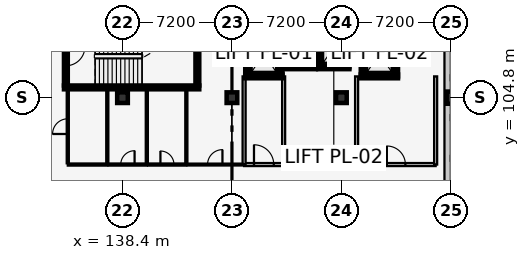
"""IFC4 building model, lengths in metres.
Left out: names, types, materials, properties, quantities, classifications, styles, units other than length and angle.
Written with IfcOpenShell. Run it as: python <this file> out.ifc"""

import sys

from ifc_helpers import new_model, si_unit, direction, frame, frame_2d, origin, origin_2d, place, context, subcontext, project, spatial, rectangle, extrude, element, fill, save


model = new_model("IFC4")
c1 = context("Model", 3, precision=1e-05, world=origin(), true_north=direction((0.0, 1.0)))
c2 = subcontext(c1, "Body", "Model", "MODEL_VIEW")
j1 = project(units=[si_unit("LENGTHUNIT", "METRE"), si_unit("PLANEANGLEUNIT", "RADIAN")], contexts=[c1])
p1 = place(None, origin())
s1 = spatial("IfcSite", under=j1, at=p1, CompositionType="ELEMENT")
p2 = place(p1, origin())
s2 = spatial("IfcBuilding", under=s1, at=p2, CompositionType="ELEMENT")
p3 = place(p2, frame((0.0, 0.0, 9.6)))
s3 = spatial("IfcBuildingStorey", under=s2, at=p3, CompositionType="ELEMENT", Elevation=9.6)
for number, where, z_axis, x_axis in (
    (1, (138.4, 104.8, 0.0), (0.0, 0.0, 1.0), (1.0, 0.0, 0.0)),
    (2, (145.6, 104.8, 0.0), (0.0, 0.0, 1.0), (1.0, 0.0, 0.0)),
    (3, (152.8, 104.8, 0.0), (0.0, 0.0, 1.0), (1.0, 0.0, 0.0)),
):
    element("IfcColumn", number, at=place(p3, frame(where, z_axis=z_axis, x_axis=x_axis)), inside=s3, PredefinedType="COLUMN", context=c2, shape_type="SweptSolid", body=[
        extrude(rectangle(XDim=0.7, YDim=0.7, at=origin_2d()), origin(), (0.0, 0.0, 1.0), 4.2),
    ])
p4 = place(p3, frame((160.0, 104.8, 0.0), z_axis=(0.0, 0.0, 1.0), x_axis=(1.0, 0.0, 0.0)))
e4 = element("IfcColumn", 4, at=p4, inside=s3, PredefinedType="COLUMN", context=c2, shape_type="SweptSolid", body=[
    extrude(rectangle(XDim=0.55, YDim=0.8, at=origin_2d()), origin(), (0.0, 0.0, 1.0), 4.2),
])
p5 = place(p3, frame((159.79, 112.0, 0.0), z_axis=(0.0, 0.0, 1.0), x_axis=(0.0, -1.0, 0.0)))
e5 = element("IfcWall", 5, at=p5, inside=s3, PredefinedType="SOLIDWALL", context=c2, shape_type="SweptSolid", body=[
    extrude(rectangle(XDim=28.8, YDim=0.42, at=frame_2d((14.4, 0.0))), origin(), (0.0, 0.0, 1.0), 3.345),
])
p6 = place(p3, frame((134.55, 105.475, 0.0), z_axis=(0.0, 0.0, 1.0), x_axis=(1.0, 0.0, 0.0)))
e6 = element("IfcWall", 6, at=p6, inside=s3, PredefinedType="SHEAR", context=c2, shape_type="SweptSolid", body=[
    extrude(rectangle(XDim=8.9, YDim=0.25, at=frame_2d((4.45, 0.0))), origin(), (0.0, 0.0, 1.0), 3.95),
])
p7 = place(p3, frame((134.675, 109.45, 0.0), z_axis=(0.0, 0.0, 1.0), x_axis=(0.0, -1.0, 0.0)))
e7 = element("IfcWall", 7, at=p7, inside=s3, PredefinedType="SHEAR", context=c2, shape_type="SweptSolid", body=[
    extrude(rectangle(XDim=3.85, YDim=0.25, at=frame_2d((1.925, 0.0))), origin(), (0.0, 0.0, 1.0), 3.95),
])
p8 = place(p7, frame((1.3, 0.0, 0.0)))
e8 = element("IfcOpeningElement", 8, at=p8, cuts=e7, PredefinedType="OPENING", context=c2, shape_type="SweptSolid", body=[
    extrude(rectangle(XDim=1.25, YDim=2.15, at=frame_2d((0.625, 1.075))), frame((0.0, 0.137, 0.0), z_axis=(0.0, -1.0, 0.0), x_axis=(1.0, 0.0, 0.0)), (0.0, 0.0, 1.0), 0.274),
])
p9 = place(p3, frame((143.325, 105.6, 0.0), z_axis=(0.0, 0.0, 1.0), x_axis=(0.0, 1.0, 0.0)))
e9 = element("IfcWall", 9, at=p9, inside=s3, PredefinedType="SHEAR", context=c2, shape_type="SweptSolid", body=[
    extrude(rectangle(XDim=3.85, YDim=0.25, at=frame_2d((1.925, 0.0))), origin(), (0.0, 0.0, 1.0), 3.95),
])
p10 = place(p3, frame((146.475, 106.2, 0.0), z_axis=(0.0, 0.0, 1.0), x_axis=(1.0, 0.0, 0.0)))
e10 = element("IfcWall", 10, at=p10, inside=s3, PredefinedType="SHEAR", context=c2, shape_type="SweptSolid", body=[
    extrude(rectangle(XDim=2.45, YDim=0.25, at=frame_2d((1.225, 0.0))), origin(), (0.0, 0.0, 1.0), 3.95),
])
p11 = place(p10, frame((0.675, 0.0, 0.0)))
e11 = element("IfcOpeningElement", 11, at=p11, cuts=e10, PredefinedType="OPENING", context=c2, shape_type="SweptSolid", body=[
    extrude(rectangle(XDim=1.1, YDim=2.15, at=frame_2d((0.55, 1.075))), frame((0.0, 0.137, 0.0), z_axis=(0.0, -1.0, 0.0), x_axis=(1.0, 0.0, 0.0)), (0.0, 0.0, 1.0), 0.274),
])
for number, where, z_axis, x_axis in (
    (12, (146.6, 109.2, 0.0), (0.0, 0.0, 1.0), (0.0, -1.0, 0.0)),
    (13, (148.8, 106.2, 0.0), (0.0, 0.0, 1.0), (0.0, 1.0, 0.0)),
):
    element("IfcWall", number, at=place(p3, frame(where, z_axis=z_axis, x_axis=x_axis)), inside=s3, PredefinedType="SHEAR", context=c2, shape_type="SweptSolid", body=[
        extrude(rectangle(XDim=3.0, YDim=0.25, at=frame_2d((1.5, 0.0))), origin(), (0.0, 0.0, 1.0), 3.95),
    ])
p12 = place(p3, frame((146.4, 100.4, 0.0), z_axis=(0.0, 0.0, 1.0), x_axis=(1.0, 0.0, 0.0)))
e14 = element("IfcWall", 14, at=p12, inside=s3, PredefinedType="PARTITIONING", context=c2, shape_type="SweptSolid", body=[
    extrude(rectangle(XDim=2.6, YDim=0.2, at=frame_2d((1.3, 0.0))), origin(), (0.0, 0.0, 1.0), 3.95),
])
p13 = place(p12, frame((0.65, 0.0, 0.0)))
e15 = element("IfcOpeningElement", 15, at=p13, cuts=e14, PredefinedType="OPENING", context=c2, shape_type="SweptSolid", body=[
    extrude(rectangle(XDim=1.3, YDim=2.2, at=frame_2d((0.65, 1.1))), frame((0.0, 0.112, 0.0), z_axis=(0.0, -1.0, 0.0), x_axis=(1.0, 0.0, 0.0)), (0.0, 0.0, 1.0), 0.224),
])
p14 = place(p3, frame((146.4, 106.2, 0.0), z_axis=(0.0, 0.0, 1.0), x_axis=(0.0, -1.0, 0.0)))
e16 = element("IfcWall", 16, at=p14, inside=s3, PredefinedType="PARTITIONING", context=c2, shape_type="SweptSolid", body=[
    extrude(rectangle(XDim=5.8, YDim=0.2, at=frame_2d((2.9, 0.0))), origin(), (0.0, 0.0, 1.0), 3.95),
])
p15 = place(p3, frame((149.0, 100.4, 0.0), z_axis=(0.0, 0.0, 1.0), x_axis=(0.0, 1.0, 0.0)))
e17 = element("IfcWall", 17, at=p15, inside=s3, PredefinedType="PARTITIONING", context=c2, shape_type="SweptSolid", body=[
    extrude(rectangle(XDim=5.8, YDim=0.2, at=frame_2d((2.9, 0.0))), origin(), (0.0, 0.0, 1.0), 3.705),
])
p16 = place(p3, frame((154.075, 106.2, 0.0), z_axis=(0.0, 0.0, 1.0), x_axis=(1.0, 0.0, 0.0)))
e18 = element("IfcWall", 18, at=p16, inside=s3, PredefinedType="SHEAR", context=c2, shape_type="SweptSolid", body=[
    extrude(rectangle(XDim=2.45, YDim=0.25, at=frame_2d((1.225, 0.0))), origin(), (0.0, 0.0, 1.0), 3.95),
])
p17 = place(p16, frame((0.675, 0.0, 0.0)))
e19 = element("IfcOpeningElement", 19, at=p17, cuts=e18, PredefinedType="OPENING", context=c2, shape_type="SweptSolid", body=[
    extrude(rectangle(XDim=1.1, YDim=2.15, at=frame_2d((0.55, 1.075))), frame((0.0, 0.137, 0.0), z_axis=(0.0, -1.0, 0.0), x_axis=(1.0, 0.0, 0.0)), (0.0, 0.0, 1.0), 0.274),
])
for number, where, z_axis, x_axis in (
    (20, (154.2, 109.2, 0.0), (0.0, 0.0, 1.0), (0.0, -1.0, 0.0)),
    (21, (156.4, 106.2, 0.0), (0.0, 0.0, 1.0), (0.0, 1.0, 0.0)),
):
    element("IfcWall", number, at=place(p3, frame(where, z_axis=z_axis, x_axis=x_axis)), inside=s3, PredefinedType="SHEAR", context=c2, shape_type="SweptSolid", body=[
        extrude(rectangle(XDim=3.0, YDim=0.25, at=frame_2d((1.5, 0.0))), origin(), (0.0, 0.0, 1.0), 3.95),
    ])
p18 = place(p3, frame((153.8, 100.4, 0.0), z_axis=(0.0, 0.0, 1.0), x_axis=(1.0, 0.0, 0.0)))
e22 = element("IfcWall", 22, at=p18, inside=s3, PredefinedType="PARTITIONING", context=c2, shape_type="SweptSolid", body=[
    extrude(rectangle(XDim=5.2, YDim=0.2, at=frame_2d((2.6, 0.0))), origin(), (0.0, 0.0, 1.0), 3.95),
])
p19 = place(p18, frame((1.99, 0.0, 0.0)))
e23 = element("IfcOpeningElement", 23, at=p19, cuts=e22, PredefinedType="OPENING", context=c2, shape_type="SweptSolid", body=[
    extrude(rectangle(XDim=1.22, YDim=2.2, at=frame_2d((0.61, 1.1))), frame((0.0, 0.112, 0.0), z_axis=(0.0, -1.0, 0.0), x_axis=(1.0, 0.0, 0.0)), (0.0, 0.0, 1.0), 0.224),
])
for number, where, z_axis, x_axis in (
    (24, (153.8, 106.2, 0.0), (0.0, 0.0, 1.0), (0.0, -1.0, 0.0)),
    (25, (159.0, 100.4, 0.0), (0.0, 0.0, 1.0), (0.0, 1.0, 0.0)),
):
    element("IfcWall", number, at=place(p3, frame(where, z_axis=z_axis, x_axis=x_axis)), inside=s3, PredefinedType="PARTITIONING", context=c2, shape_type="SweptSolid", body=[
        extrude(rectangle(XDim=5.8, YDim=0.2, at=frame_2d((2.9, 0.0))), origin(), (0.0, 0.0, 1.0), 3.95),
    ])
p20 = place(p3, frame((149.075, 106.8, 0.0), z_axis=(0.0, 0.0, 1.0), x_axis=(1.0, 0.0, 0.0)))
e26 = element("IfcWall", 26, at=p20, inside=s3, PredefinedType="SHEAR", context=c2, shape_type="SweptSolid", body=[
    extrude(rectangle(XDim=2.05, YDim=0.25, at=frame_2d((1.025, 0.0))), origin(), (0.0, 0.0, 1.0), 3.95),
])
p21 = place(p20, frame((0.525, 0.0, 0.0)))
e27 = element("IfcOpeningElement", 27, at=p21, cuts=e26, PredefinedType="OPENING", context=c2, shape_type="SweptSolid", body=[
    extrude(rectangle(XDim=1.0, YDim=2.15, at=frame_2d((0.5, 1.075))), frame((0.0, 0.137, 0.0), z_axis=(0.0, -1.0, 0.0), x_axis=(1.0, 0.0, 0.0)), (0.0, 0.0, 1.0), 0.274),
])
for number, where, z_axis, x_axis in (
    (28, (149.2, 109.4, 0.0), (0.0, 0.0, 1.0), (0.0, -1.0, 0.0)),
    (29, (151.0, 106.8, 0.0), (0.0, 0.0, 1.0), (0.0, 1.0, 0.0)),
):
    element("IfcWall", number, at=place(p3, frame(where, z_axis=z_axis, x_axis=x_axis)), inside=s3, PredefinedType="SHEAR", context=c2, shape_type="SweptSolid", body=[
        extrude(rectangle(XDim=2.6, YDim=0.25, at=frame_2d((1.3, 0.0))), origin(), (0.0, 0.0, 1.0), 3.95),
    ])
p22 = place(p3, frame((151.275, 106.8, 0.0), z_axis=(0.0, 0.0, 1.0), x_axis=(1.0, 0.0, 0.0)))
e30 = element("IfcWall", 30, at=p22, inside=s3, PredefinedType="SHEAR", context=c2, shape_type="SweptSolid", body=[
    extrude(rectangle(XDim=2.05, YDim=0.25, at=frame_2d((1.025, 0.0))), origin(), (0.0, 0.0, 1.0), 3.95),
])
p23 = place(p22, frame((0.525, 0.0, 0.0)))
e31 = element("IfcOpeningElement", 31, at=p23, cuts=e30, PredefinedType="OPENING", context=c2, shape_type="SweptSolid", body=[
    extrude(rectangle(XDim=1.0, YDim=2.15, at=frame_2d((0.5, 1.075))), frame((0.0, 0.137, 0.0), z_axis=(0.0, -1.0, 0.0), x_axis=(1.0, 0.0, 0.0)), (0.0, 0.0, 1.0), 0.274),
])
for number, where, z_axis, x_axis in (
    (32, (151.4, 109.4, 0.0), (0.0, 0.0, 1.0), (0.0, -1.0, 0.0)),
    (33, (153.2, 106.8, 0.0), (0.0, 0.0, 1.0), (0.0, 1.0, 0.0)),
):
    element("IfcWall", number, at=place(p3, frame(where, z_axis=z_axis, x_axis=x_axis)), inside=s3, PredefinedType="SHEAR", context=c2, shape_type="SweptSolid", body=[
        extrude(rectangle(XDim=2.6, YDim=0.25, at=frame_2d((1.3, 0.0))), origin(), (0.0, 0.0, 1.0), 3.95),
    ])
p24 = place(p3, frame((134.8, 100.4, 0.0), z_axis=(0.0, 0.0, 1.0), x_axis=(1.0, 0.0, 0.0)))
e34 = element("IfcWall", 34, at=p24, inside=s3, PredefinedType="PARTITIONING", context=c2, shape_type="SweptSolid", body=[
    extrude(rectangle(XDim=2.6, YDim=0.14, at=frame_2d((1.3, 0.0))), origin(), (0.0, 0.0, 1.0), 3.95),
])
p25 = place(p3, frame((134.8, 100.48, 0.0), z_axis=(0.0, 0.0, 1.0), x_axis=(0.0, 1.0, 0.0)))
e35 = element("IfcWall", 35, at=p25, inside=s3, PredefinedType="PARTITIONING", context=c2, shape_type="SweptSolid", body=[
    extrude(rectangle(XDim=4.86, YDim=0.14, at=frame_2d((2.43, 0.0))), origin(), (0.0, 0.0, 1.0), 3.675),
])
p26 = place(p25, frame((1.93, 0.0, 0.0)))
e36 = element("IfcOpeningElement", 36, at=p26, cuts=e35, PredefinedType="OPENING", context=c2, shape_type="SweptSolid", body=[
    extrude(rectangle(XDim=1.0, YDim=2.1, at=frame_2d((0.5, 1.05))), frame((0.0, 0.082, 0.0), z_axis=(0.0, -1.0, 0.0), x_axis=(1.0, 0.0, 0.0)), (0.0, 0.0, 1.0), 0.164),
])
p27 = place(p3, frame((137.4, 100.48, 0.0), z_axis=(0.0, 0.0, 1.0), x_axis=(0.0, 1.0, 0.0)))
e37 = element("IfcWall", 37, at=p27, inside=s3, PredefinedType="PARTITIONING", context=c2, shape_type="SweptSolid", body=[
    extrude(rectangle(XDim=4.86, YDim=0.14, at=frame_2d((2.43, 0.0))), origin(), (0.0, 0.0, 1.0), 3.95),
])
p28 = place(p3, frame((137.48, 100.4, 0.0), z_axis=(0.0, 0.0, 1.0), x_axis=(1.0, 0.0, 0.0)))
e38 = element("IfcWall", 38, at=p28, inside=s3, PredefinedType="PARTITIONING", context=c2, shape_type="SweptSolid", body=[
    extrude(rectangle(XDim=2.52, YDim=0.14, at=frame_2d((1.26, 0.0))), origin(), (0.0, 0.0, 1.0), 3.95),
])
p29 = place(p28, frame((0.805, 0.0, 0.0)))
e39 = element("IfcOpeningElement", 39, at=p29, cuts=e38, PredefinedType="OPENING", context=c2, shape_type="SweptSolid", body=[
    extrude(rectangle(XDim=0.91, YDim=2.06, at=frame_2d((0.455, 1.03))), frame((0.0, 0.082, 0.0), z_axis=(0.0, -1.0, 0.0), x_axis=(1.0, 0.0, 0.0)), (0.0, 0.0, 1.0), 0.164),
])
p30 = place(p3, frame((140.0, 100.48, 0.0), z_axis=(0.0, 0.0, 1.0), x_axis=(0.0, 1.0, 0.0)))
e40 = element("IfcWall", 40, at=p30, inside=s3, PredefinedType="PARTITIONING", context=c2, shape_type="SweptSolid", body=[
    extrude(rectangle(XDim=4.86, YDim=0.14, at=frame_2d((2.43, 0.0))), origin(), (0.0, 0.0, 1.0), 3.95),
])
p31 = place(p3, frame((140.08, 100.4, 0.0), z_axis=(0.0, 0.0, 1.0), x_axis=(1.0, 0.0, 0.0)))
e41 = element("IfcWall", 41, at=p31, inside=s3, PredefinedType="PARTITIONING", context=c2, shape_type="SweptSolid", body=[
    extrude(rectangle(XDim=2.52, YDim=0.14, at=frame_2d((1.26, 0.0))), origin(), (0.0, 0.0, 1.0), 3.95),
])
p32 = place(p31, frame((0.815, 0.0, 0.0)))
e42 = element("IfcOpeningElement", 42, at=p32, cuts=e41, PredefinedType="OPENING", context=c2, shape_type="SweptSolid", body=[
    extrude(rectangle(XDim=0.89, YDim=2.05, at=frame_2d((0.445, 1.025))), frame((0.0, 0.082, 0.0), z_axis=(0.0, -1.0, 0.0), x_axis=(1.0, 0.0, 0.0)), (0.0, 0.0, 1.0), 0.164),
])
p33 = place(p3, frame((142.6, 100.48, 0.0), z_axis=(0.0, 0.0, 1.0), x_axis=(0.0, 1.0, 0.0)))
e43 = element("IfcWall", 43, at=p33, inside=s3, PredefinedType="PARTITIONING", context=c2, shape_type="SweptSolid", body=[
    extrude(rectangle(XDim=4.86, YDim=0.14, at=frame_2d((2.43, 0.0))), origin(), (0.0, 0.0, 1.0), 3.95),
])
p34 = place(p3, frame((142.68, 100.4, 0.0), z_axis=(0.0, 0.0, 1.0), x_axis=(1.0, 0.0, 0.0)))
e44 = element("IfcWall", 44, at=p34, inside=s3, PredefinedType="PARTITIONING", context=c2, shape_type="SweptSolid", body=[
    extrude(rectangle(XDim=3.61, YDim=0.125, at=frame_2d((1.805, 0.0))), origin(), (0.0, 0.0, 1.0), 3.95),
])
p35 = place(p34, frame((1.315, 0.0, 0.0)))
e45 = element("IfcOpeningElement", 45, at=p35, cuts=e44, PredefinedType="OPENING", context=c2, shape_type="SweptSolid", body=[
    extrude(rectangle(XDim=0.98, YDim=2.12, at=frame_2d((0.49, 1.06))), frame((0.0, 0.074, 0.0), z_axis=(0.0, -1.0, 0.0), x_axis=(1.0, 0.0, 0.0)), (0.0, 0.0, 1.0), 0.149),
])
p36 = place(p8, origin())
e46 = element("IfcDoor", 46, at=p36, inside=s3, OperationType="SINGLE_SWING_LEFT", PredefinedType="DOOR", context=c2, shape_type="SweptSolid", body=[
    extrude(rectangle(XDim=1.25, YDim=2.15, at=frame_2d((0.625, 1.075))), frame((0.0, 0.025, 0.0), z_axis=(0.0, -1.0, 0.0), x_axis=(1.0, 0.0, 0.0)), (0.0, 0.0, 1.0), 0.05),
])
fill(e8, e46)
p37 = place(p11, origin())
e47 = element("IfcDoor", 47, at=p37, inside=s3, OperationType="SLIDING_TO_LEFT", PredefinedType="DOOR", context=c2, shape_type="SweptSolid", body=[
    extrude(rectangle(XDim=1.1, YDim=2.15, at=frame_2d((0.55, 1.075))), frame((0.0, 0.025, 0.0), z_axis=(0.0, -1.0, 0.0), x_axis=(1.0, 0.0, 0.0)), (0.0, 0.0, 1.0), 0.05),
])
fill(e11, e47)
p38 = place(p13, origin())
e48 = element("IfcDoor", 48, at=p38, inside=s3, OperationType="SINGLE_SWING_LEFT", PredefinedType="DOOR", context=c2, shape_type="SweptSolid", body=[
    extrude(rectangle(XDim=1.3, YDim=2.2, at=frame_2d((0.65, 1.1))), frame((0.0, 0.025, 0.0), z_axis=(0.0, -1.0, 0.0), x_axis=(1.0, 0.0, 0.0)), (0.0, 0.0, 1.0), 0.05),
])
fill(e15, e48)
p39 = place(p17, origin())
e49 = element("IfcDoor", 49, at=p39, inside=s3, OperationType="SLIDING_TO_LEFT", PredefinedType="DOOR", context=c2, shape_type="SweptSolid", body=[
    extrude(rectangle(XDim=1.1, YDim=2.15, at=frame_2d((0.55, 1.075))), frame((0.0, 0.025, 0.0), z_axis=(0.0, -1.0, 0.0), x_axis=(1.0, 0.0, 0.0)), (0.0, 0.0, 1.0), 0.05),
])
fill(e19, e49)
p40 = place(p19, origin())
e50 = element("IfcDoor", 50, at=p40, inside=s3, OperationType="SINGLE_SWING_LEFT", PredefinedType="DOOR", context=c2, shape_type="SweptSolid", body=[
    extrude(rectangle(XDim=1.22, YDim=2.2, at=frame_2d((0.61, 1.1))), frame((0.0, 0.025, 0.0), z_axis=(0.0, -1.0, 0.0), x_axis=(1.0, 0.0, 0.0)), (0.0, 0.0, 1.0), 0.05),
])
fill(e23, e50)
p41 = place(p21, origin())
e51 = element("IfcDoor", 51, at=p41, inside=s3, OperationType="SLIDING_TO_LEFT", PredefinedType="DOOR", context=c2, shape_type="SweptSolid", body=[
    extrude(rectangle(XDim=1.0, YDim=2.15, at=frame_2d((0.5, 1.075))), frame((0.0, 0.025, 0.0), z_axis=(0.0, -1.0, 0.0), x_axis=(1.0, 0.0, 0.0)), (0.0, 0.0, 1.0), 0.05),
])
fill(e27, e51)
p42 = place(p23, origin())
e52 = element("IfcDoor", 52, at=p42, inside=s3, OperationType="SLIDING_TO_LEFT", PredefinedType="DOOR", context=c2, shape_type="SweptSolid", body=[
    extrude(rectangle(XDim=1.0, YDim=2.15, at=frame_2d((0.5, 1.075))), frame((0.0, 0.025, 0.0), z_axis=(0.0, -1.0, 0.0), x_axis=(1.0, 0.0, 0.0)), (0.0, 0.0, 1.0), 0.05),
])
fill(e31, e52)
p43 = place(p26, origin())
e53 = element("IfcDoor", 53, at=p43, inside=s3, OperationType="SINGLE_SWING_LEFT", PredefinedType="DOOR", context=c2, shape_type="SweptSolid", body=[
    extrude(rectangle(XDim=1.0, YDim=2.1, at=frame_2d((0.5, 1.05))), frame((0.0, 0.025, 0.0), z_axis=(0.0, -1.0, 0.0), x_axis=(1.0, 0.0, 0.0)), (0.0, 0.0, 1.0), 0.05),
])
fill(e36, e53)
p44 = place(p29, origin())
e54 = element("IfcDoor", 54, at=p44, inside=s3, OperationType="SINGLE_SWING_RIGHT", PredefinedType="DOOR", context=c2, shape_type="SweptSolid", body=[
    extrude(rectangle(XDim=0.91, YDim=2.06, at=frame_2d((0.455, 1.03))), frame((0.0, 0.025, 0.0), z_axis=(0.0, -1.0, 0.0), x_axis=(1.0, 0.0, 0.0)), (0.0, 0.0, 1.0), 0.05),
])
fill(e39, e54)
p45 = place(p32, origin())
e55 = element("IfcDoor", 55, at=p45, inside=s3, OperationType="SINGLE_SWING_LEFT", PredefinedType="DOOR", context=c2, shape_type="SweptSolid", body=[
    extrude(rectangle(XDim=0.89, YDim=2.05, at=frame_2d((0.445, 1.025))), frame((0.0, 0.025, 0.0), z_axis=(0.0, -1.0, 0.0), x_axis=(1.0, 0.0, 0.0)), (0.0, 0.0, 1.0), 0.05),
])
fill(e42, e55)
p46 = place(p35, origin())
e56 = element("IfcDoor", 56, at=p46, inside=s3, OperationType="SINGLE_SWING_RIGHT", PredefinedType="DOOR", context=c2, shape_type="SweptSolid", body=[
    extrude(rectangle(XDim=0.98, YDim=2.12, at=frame_2d((0.49, 1.06))), frame((0.0, 0.025, 0.0), z_axis=(0.0, -1.0, 0.0), x_axis=(1.0, 0.0, 0.0)), (0.0, 0.0, 1.0), 0.05),
])
fill(e45, e56)
save(model, sys.argv[1])
